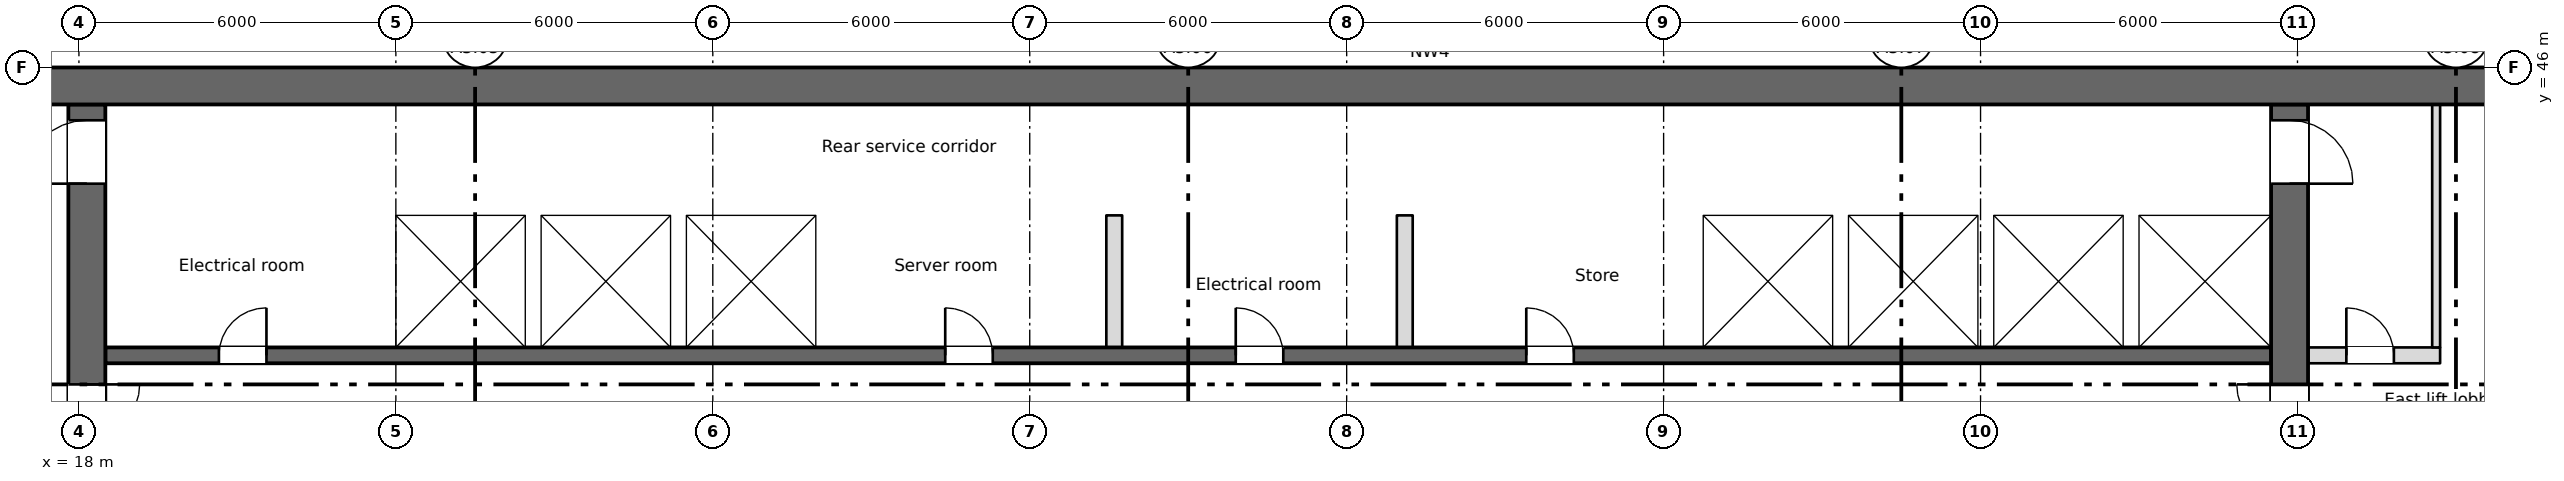
"""IFC4 building model, lengths in metres.
Left out: names, types, materials, properties, quantities, classifications, styles, units other than length and angle.
Written with IfcOpenShell. Run it as: python <this file> out.ifc"""

import sys

from ifc_helpers import new_model, si_unit, direction, frame, frame_2d, origin, place, context, subcontext, project, spatial, rectangle, extrude, element, fill, save


model = new_model("IFC4")
c1 = context("Model", 3, precision=1e-05, world=origin(), true_north=direction((0.0, 1.0)))
c2 = subcontext(c1, "Body", "Model", "MODEL_VIEW")
j1 = project(units=[si_unit("LENGTHUNIT", "METRE"), si_unit("PLANEANGLEUNIT", "RADIAN")], contexts=[c1])
p1 = place(None, origin())
s1 = spatial("IfcSite", under=j1, at=p1, CompositionType="ELEMENT")
p2 = place(p1, origin())
s2 = spatial("IfcBuilding", under=s1, at=p2, CompositionType="ELEMENT")
p3 = place(p2, frame((0.0, 0.0, 223.0)))
s3 = spatial("IfcBuildingStorey", under=s2, at=p3, CompositionType="ELEMENT", Elevation=223.0)
p4 = place(p3, frame((11.55, 45.65, 0.0), z_axis=(0.0, 0.0, 1.0), x_axis=(1.0, 0.0, 0.0)))
e1 = element("IfcWall", 1, at=p4, inside=s3, PredefinedType="SHEAR", context=c2, shape_type="SweptSolid", body=[
    extrude(rectangle(XDim=54.9, YDim=0.7, at=frame_2d((27.45, 0.0))), origin(), (0.0, 0.0, 1.0), 3.15),
])
p5 = place(p4, frame((1.2, 0.0, 0.6)))
e2 = element("IfcOpeningElement", 2, at=p5, cuts=e1, PredefinedType="OPENING", context=c2, shape_type="SweptSolid", body=[
    extrude(rectangle(XDim=0.6, YDim=2.4, at=frame_2d((0.3, 1.2))), frame((0.0, 0.36, 0.0), z_axis=(0.0, -1.0, 0.0), x_axis=(1.0, 0.0, 0.0)), (0.0, 0.0, 1.0), 0.72),
])
p6 = place(p3, frame((18.15, 28.4, 0.0), z_axis=(0.0, 0.0, 1.0), x_axis=(0.0, 1.0, 0.0)))
e3 = element("IfcWall", 3, at=p6, inside=s3, PredefinedType="SHEAR", context=c2, shape_type="SweptSolid", body=[
    extrude(rectangle(XDim=16.9, YDim=0.7, at=frame_2d((8.45, 0.0))), origin(), (0.0, 0.0, 1.0), 3.15),
])
p7 = place(p6, frame((9.6, 0.0, 0.0)))
e4 = element("IfcOpeningElement", 4, at=p7, cuts=e3, PredefinedType="OPENING", context=c2, shape_type="SweptSolid", body=[
    extrude(rectangle(XDim=2.0, YDim=2.1, at=frame_2d((1.0, 1.05))), frame((0.0, 0.36, 0.0), z_axis=(0.0, -1.0, 0.0), x_axis=(1.0, 0.0, 0.0)), (0.0, 0.0, 1.0), 0.72),
])
p8 = place(p6, frame((15.4, 0.0, 0.0)))
e5 = element("IfcOpeningElement", 5, at=p8, cuts=e3, PredefinedType="OPENING", context=c2, shape_type="SweptSolid", body=[
    extrude(rectangle(XDim=1.2, YDim=2.1, at=frame_2d((0.6, 1.05))), frame((0.0, 0.36, 0.0), z_axis=(0.0, -1.0, 0.0), x_axis=(1.0, 0.0, 0.0)), (0.0, 0.0, 1.0), 0.72),
])
p9 = place(p3, frame((59.85, 28.4, 0.0), z_axis=(0.0, 0.0, 1.0), x_axis=(0.0, 1.0, 0.0)))
e6 = element("IfcWall", 6, at=p9, inside=s3, PredefinedType="SHEAR", context=c2, shape_type="SweptSolid", body=[
    extrude(rectangle(XDim=16.9, YDim=0.7, at=frame_2d((8.45, 0.0))), origin(), (0.0, 0.0, 1.0), 3.15),
])
p10 = place(p9, frame((9.6, 0.0, 0.0)))
e7 = element("IfcOpeningElement", 7, at=p10, cuts=e6, PredefinedType="OPENING", context=c2, shape_type="SweptSolid", body=[
    extrude(rectangle(XDim=2.0, YDim=2.1, at=frame_2d((1.0, 1.05))), frame((0.0, 0.36, 0.0), z_axis=(0.0, -1.0, 0.0), x_axis=(1.0, 0.0, 0.0)), (0.0, 0.0, 1.0), 0.72),
])
p11 = place(p9, frame((15.4, 0.0, 0.0)))
e8 = element("IfcOpeningElement", 8, at=p11, cuts=e6, PredefinedType="OPENING", context=c2, shape_type="SweptSolid", body=[
    extrude(rectangle(XDim=1.2, YDim=2.1, at=frame_2d((0.6, 1.05))), frame((0.0, 0.36, 0.0), z_axis=(0.0, -1.0, 0.0), x_axis=(1.0, 0.0, 0.0)), (0.0, 0.0, 1.0), 0.72),
])
p12 = place(p3, frame((18.5, 40.55, 0.0), z_axis=(0.0, 0.0, 1.0), x_axis=(1.0, 0.0, 0.0)))
e9 = element("IfcWall", 9, at=p12, inside=s3, PredefinedType="SHEAR", context=c2, shape_type="SweptSolid", body=[
    extrude(rectangle(XDim=41.0, YDim=0.3, at=frame_2d((20.5, 0.0))), origin(), (0.0, 0.0, 1.0), 3.15),
])
p13 = place(p12, frame((2.15, 0.0, 0.0)))
e10 = element("IfcOpeningElement", 10, at=p13, cuts=e9, PredefinedType="OPENING", context=c2, shape_type="SweptSolid", body=[
    extrude(rectangle(XDim=0.9, YDim=2.1, at=frame_2d((0.45, 1.05))), frame((0.0, 0.16, 0.0), z_axis=(0.0, -1.0, 0.0), x_axis=(1.0, 0.0, 0.0)), (0.0, 0.0, 1.0), 0.32),
])
p14 = place(p12, frame((15.9, 0.0, 0.0)))
e11 = element("IfcOpeningElement", 11, at=p14, cuts=e9, PredefinedType="OPENING", context=c2, shape_type="SweptSolid", body=[
    extrude(rectangle(XDim=0.9, YDim=2.1, at=frame_2d((0.45, 1.05))), frame((0.0, 0.16, 0.0), z_axis=(0.0, -1.0, 0.0), x_axis=(1.0, 0.0, 0.0)), (0.0, 0.0, 1.0), 0.32),
])
p15 = place(p12, frame((21.4, 0.0, 0.0)))
e12 = element("IfcOpeningElement", 12, at=p15, cuts=e9, PredefinedType="OPENING", context=c2, shape_type="SweptSolid", body=[
    extrude(rectangle(XDim=0.9, YDim=2.1, at=frame_2d((0.45, 1.05))), frame((0.0, 0.16, 0.0), z_axis=(0.0, -1.0, 0.0), x_axis=(1.0, 0.0, 0.0)), (0.0, 0.0, 1.0), 0.32),
])
p16 = place(p12, frame((26.9, 0.0, 0.0)))
e13 = element("IfcOpeningElement", 13, at=p16, cuts=e9, PredefinedType="OPENING", context=c2, shape_type="SweptSolid", body=[
    extrude(rectangle(XDim=0.9, YDim=2.1, at=frame_2d((0.45, 1.05))), frame((0.0, 0.16, 0.0), z_axis=(0.0, -1.0, 0.0), x_axis=(1.0, 0.0, 0.0)), (0.0, 0.0, 1.0), 0.32),
])
p17 = place(p12, frame((6.175, 0.0, 0.0)))
e14 = element("IfcOpeningElement", 14, at=p17, cuts=e9, PredefinedType="OPENING", context=c2, shape_type="SweptSolid", body=[
    extrude(rectangle(XDim=1.1, YDim=2.1, at=frame_2d((0.55, 1.05))), frame((0.0, 0.16, 0.0), z_axis=(0.0, -1.0, 0.0), x_axis=(1.0, 0.0, 0.0)), (0.0, 0.0, 1.0), 0.32),
])
p18 = place(p12, frame((8.925, 0.0, 0.0)))
e15 = element("IfcOpeningElement", 15, at=p18, cuts=e9, PredefinedType="OPENING", context=c2, shape_type="SweptSolid", body=[
    extrude(rectangle(XDim=1.1, YDim=2.1, at=frame_2d((0.55, 1.05))), frame((0.0, 0.16, 0.0), z_axis=(0.0, -1.0, 0.0), x_axis=(1.0, 0.0, 0.0)), (0.0, 0.0, 1.0), 0.32),
])
p19 = place(p12, frame((11.675, 0.0, 0.0)))
e16 = element("IfcOpeningElement", 16, at=p19, cuts=e9, PredefinedType="OPENING", context=c2, shape_type="SweptSolid", body=[
    extrude(rectangle(XDim=1.1, YDim=2.1, at=frame_2d((0.55, 1.05))), frame((0.0, 0.16, 0.0), z_axis=(0.0, -1.0, 0.0), x_axis=(1.0, 0.0, 0.0)), (0.0, 0.0, 1.0), 0.32),
])
p20 = place(p12, frame((30.925, 0.0, 0.0)))
e17 = element("IfcOpeningElement", 17, at=p20, cuts=e9, PredefinedType="OPENING", context=c2, shape_type="SweptSolid", body=[
    extrude(rectangle(XDim=1.1, YDim=2.1, at=frame_2d((0.55, 1.05))), frame((0.0, 0.16, 0.0), z_axis=(0.0, -1.0, 0.0), x_axis=(1.0, 0.0, 0.0)), (0.0, 0.0, 1.0), 0.32),
])
p21 = place(p12, frame((33.675, 0.0, 0.0)))
e18 = element("IfcOpeningElement", 18, at=p21, cuts=e9, PredefinedType="OPENING", context=c2, shape_type="SweptSolid", body=[
    extrude(rectangle(XDim=1.1, YDim=2.1, at=frame_2d((0.55, 1.05))), frame((0.0, 0.16, 0.0), z_axis=(0.0, -1.0, 0.0), x_axis=(1.0, 0.0, 0.0)), (0.0, 0.0, 1.0), 0.32),
])
p22 = place(p12, frame((36.375, 0.0, 0.0)))
e19 = element("IfcOpeningElement", 19, at=p22, cuts=e9, PredefinedType="OPENING", context=c2, shape_type="SweptSolid", body=[
    extrude(rectangle(XDim=1.2, YDim=2.1, at=frame_2d((0.6, 1.05))), frame((0.0, 0.16, 0.0), z_axis=(0.0, -1.0, 0.0), x_axis=(1.0, 0.0, 0.0)), (0.0, 0.0, 1.0), 0.32),
])
p23 = place(p12, frame((39.15, 0.0, 0.0)))
e20 = element("IfcOpeningElement", 20, at=p23, cuts=e9, PredefinedType="OPENING", context=c2, shape_type="SweptSolid", body=[
    extrude(rectangle(XDim=1.2, YDim=2.1, at=frame_2d((0.6, 1.05))), frame((0.0, 0.16, 0.0), z_axis=(0.0, -1.0, 0.0), x_axis=(1.0, 0.0, 0.0)), (0.0, 0.0, 1.0), 0.32),
])
p24 = place(p3, frame((18.5, 43.35, 0.0), z_axis=(0.0, 0.0, 1.0), x_axis=(1.0, 0.0, 0.0)))
e21 = element("IfcWall", 21, at=p24, inside=s3, PredefinedType="SHEAR", context=c2, shape_type="SweptSolid", body=[
    extrude(rectangle(XDim=41.0, YDim=0.3, at=frame_2d((20.5, 0.0))), origin(), (0.0, 0.0, 1.0), 3.15),
])
p25 = place(p3, frame((60.2, 40.55, 0.0), z_axis=(0.0, 0.0, 1.0), x_axis=(1.0, 0.0, 0.0)))
e22 = element("IfcWall", 22, at=p25, inside=s3, PredefinedType="PARTITIONING", context=c2, shape_type="SweptSolid", body=[
    extrude(rectangle(XDim=2.5, YDim=0.3, at=frame_2d((1.25, 0.0))), origin(), (0.0, 0.0, 1.0), 3.15),
])
p26 = place(p25, frame((0.725, 0.0, 0.0)))
e23 = element("IfcOpeningElement", 23, at=p26, cuts=e22, PredefinedType="OPENING", context=c2, shape_type="SweptSolid", body=[
    extrude(rectangle(XDim=0.9, YDim=2.1, at=frame_2d((0.45, 1.05))), frame((0.0, 0.16, 0.0), z_axis=(0.0, -1.0, 0.0), x_axis=(1.0, 0.0, 0.0)), (0.0, 0.0, 1.0), 0.32),
])
for number, where, z_axis, x_axis in (
    (24, (23.85, 40.7, 0.0), (0.0, 0.0, 1.0), (0.0, 1.0, 0.0)),
    (25, (26.6, 40.7, 0.0), (0.0, 0.0, 1.0), (0.0, 1.0, 0.0)),
    (26, (29.35, 40.7, 0.0), (0.0, 0.0, 1.0), (0.0, 1.0, 0.0)),
    (27, (32.1, 40.7, 0.0), (0.0, 0.0, 1.0), (0.0, 1.0, 0.0)),
    (28, (48.6, 40.7, 0.0), (0.0, 0.0, 1.0), (0.0, 1.0, 0.0)),
    (29, (51.35, 40.7, 0.0), (0.0, 0.0, 1.0), (0.0, 1.0, 0.0)),
    (30, (54.1, 40.7, 0.0), (0.0, 0.0, 1.0), (0.0, 1.0, 0.0)),
    (31, (56.85, 40.7, 0.0), (0.0, 0.0, 1.0), (0.0, 1.0, 0.0)),
):
    element("IfcWall", number, at=place(p3, frame(where, z_axis=z_axis, x_axis=x_axis)), inside=s3, PredefinedType="SHEAR", context=c2, shape_type="SweptSolid", body=[
        extrude(rectangle(XDim=2.5, YDim=0.3, at=frame_2d((1.25, 0.0))), origin(), (0.0, 0.0, 1.0), 3.15),
    ])
p27 = place(p3, frame((62.625, 40.7, 0.0), z_axis=(0.0, 0.0, 1.0), x_axis=(0.0, 1.0, 0.0)))
e32 = element("IfcWall", 32, at=p27, inside=s3, PredefinedType="PARTITIONING", context=c2, shape_type="SweptSolid", body=[
    extrude(rectangle(XDim=4.6, YDim=0.15, at=frame_2d((2.3, 0.0))), origin(), (0.0, 0.0, 1.0), 3.15),
])
for number, where, z_axis, x_axis in (
    (33, (37.6, 40.7, 0.0), (0.0, 0.0, 1.0), (0.0, 1.0, 0.0)),
    (34, (43.1, 40.7, 0.0), (0.0, 0.0, 1.0), (0.0, 1.0, 0.0)),
):
    element("IfcWall", number, at=place(p3, frame(where, z_axis=z_axis, x_axis=x_axis)), inside=s3, PredefinedType="PARTITIONING", context=c2, shape_type="SweptSolid", body=[
        extrude(rectangle(XDim=2.5, YDim=0.3, at=frame_2d((1.25, 0.0))), origin(), (0.0, 0.0, 1.0), 3.15),
    ])
p28 = place(p26, origin())
e35 = element("IfcDoor", 35, at=p28, inside=s3, OperationType="SINGLE_SWING_LEFT", PredefinedType="DOOR", context=c2, shape_type="SweptSolid", body=[
    extrude(rectangle(XDim=0.9, YDim=2.1, at=frame_2d((0.45, 1.05))), frame((0.0, 0.025, 0.0), z_axis=(0.0, -1.0, 0.0), x_axis=(1.0, 0.0, 0.0)), (0.0, 0.0, 1.0), 0.05),
])
fill(e23, e35)
p29 = place(p13, origin())
e36 = element("IfcDoor", 36, at=p29, inside=s3, OperationType="SINGLE_SWING_RIGHT", PredefinedType="DOOR", context=c2, shape_type="SweptSolid", body=[
    extrude(rectangle(XDim=0.9, YDim=2.1, at=frame_2d((0.45, 1.05))), frame((0.0, 0.025, 0.0), z_axis=(0.0, -1.0, 0.0), x_axis=(1.0, 0.0, 0.0)), (0.0, 0.0, 1.0), 0.05),
])
fill(e10, e36)
p30 = place(p14, origin())
e37 = element("IfcDoor", 37, at=p30, inside=s3, OperationType="SINGLE_SWING_LEFT", PredefinedType="DOOR", context=c2, shape_type="SweptSolid", body=[
    extrude(rectangle(XDim=0.9, YDim=2.1, at=frame_2d((0.45, 1.05))), frame((0.0, 0.025, 0.0), z_axis=(0.0, -1.0, 0.0), x_axis=(1.0, 0.0, 0.0)), (0.0, 0.0, 1.0), 0.05),
])
fill(e11, e37)
p31 = place(p15, origin())
e38 = element("IfcDoor", 38, at=p31, inside=s3, OperationType="SINGLE_SWING_LEFT", PredefinedType="DOOR", context=c2, shape_type="SweptSolid", body=[
    extrude(rectangle(XDim=0.9, YDim=2.1, at=frame_2d((0.45, 1.05))), frame((0.0, 0.025, 0.0), z_axis=(0.0, -1.0, 0.0), x_axis=(1.0, 0.0, 0.0)), (0.0, 0.0, 1.0), 0.05),
])
fill(e12, e38)
p32 = place(p16, origin())
e39 = element("IfcDoor", 39, at=p32, inside=s3, OperationType="SINGLE_SWING_LEFT", PredefinedType="DOOR", context=c2, shape_type="SweptSolid", body=[
    extrude(rectangle(XDim=0.9, YDim=2.1, at=frame_2d((0.45, 1.05))), frame((0.0, 0.025, 0.0), z_axis=(0.0, -1.0, 0.0), x_axis=(1.0, 0.0, 0.0)), (0.0, 0.0, 1.0), 0.05),
])
fill(e13, e39)
p33 = place(p17, origin())
e40 = element("IfcDoor", 40, at=p33, inside=s3, OperationType="SLIDING_TO_LEFT", PredefinedType="DOOR", context=c2, shape_type="SweptSolid", body=[
    extrude(rectangle(XDim=1.1, YDim=2.1, at=frame_2d((0.55, 1.05))), frame((0.0, 0.025, 0.0), z_axis=(0.0, -1.0, 0.0), x_axis=(1.0, 0.0, 0.0)), (0.0, 0.0, 1.0), 0.05),
])
fill(e14, e40)
p34 = place(p18, origin())
e41 = element("IfcDoor", 41, at=p34, inside=s3, OperationType="SLIDING_TO_LEFT", PredefinedType="DOOR", context=c2, shape_type="SweptSolid", body=[
    extrude(rectangle(XDim=1.1, YDim=2.1, at=frame_2d((0.55, 1.05))), frame((0.0, 0.025, 0.0), z_axis=(0.0, -1.0, 0.0), x_axis=(1.0, 0.0, 0.0)), (0.0, 0.0, 1.0), 0.05),
])
fill(e15, e41)
p35 = place(p19, origin())
e42 = element("IfcDoor", 42, at=p35, inside=s3, OperationType="SLIDING_TO_LEFT", PredefinedType="DOOR", context=c2, shape_type="SweptSolid", body=[
    extrude(rectangle(XDim=1.1, YDim=2.1, at=frame_2d((0.55, 1.05))), frame((0.0, 0.025, 0.0), z_axis=(0.0, -1.0, 0.0), x_axis=(1.0, 0.0, 0.0)), (0.0, 0.0, 1.0), 0.05),
])
fill(e16, e42)
p36 = place(p20, origin())
e43 = element("IfcDoor", 43, at=p36, inside=s3, OperationType="SLIDING_TO_LEFT", PredefinedType="DOOR", context=c2, shape_type="SweptSolid", body=[
    extrude(rectangle(XDim=1.1, YDim=2.1, at=frame_2d((0.55, 1.05))), frame((0.0, 0.025, 0.0), z_axis=(0.0, -1.0, 0.0), x_axis=(1.0, 0.0, 0.0)), (0.0, 0.0, 1.0), 0.05),
])
fill(e17, e43)
p37 = place(p21, origin())
e44 = element("IfcDoor", 44, at=p37, inside=s3, OperationType="SLIDING_TO_LEFT", PredefinedType="DOOR", context=c2, shape_type="SweptSolid", body=[
    extrude(rectangle(XDim=1.1, YDim=2.1, at=frame_2d((0.55, 1.05))), frame((0.0, 0.025, 0.0), z_axis=(0.0, -1.0, 0.0), x_axis=(1.0, 0.0, 0.0)), (0.0, 0.0, 1.0), 0.05),
])
fill(e18, e44)
p38 = place(p22, origin())
e45 = element("IfcDoor", 45, at=p38, inside=s3, OperationType="SLIDING_TO_LEFT", PredefinedType="DOOR", context=c2, shape_type="SweptSolid", body=[
    extrude(rectangle(XDim=1.2, YDim=2.1, at=frame_2d((0.6, 1.05))), frame((0.0, 0.025, 0.0), z_axis=(0.0, -1.0, 0.0), x_axis=(1.0, 0.0, 0.0)), (0.0, 0.0, 1.0), 0.05),
])
fill(e19, e45)
p39 = place(p23, origin())
e46 = element("IfcDoor", 46, at=p39, inside=s3, OperationType="SLIDING_TO_LEFT", PredefinedType="DOOR", context=c2, shape_type="SweptSolid", body=[
    extrude(rectangle(XDim=1.2, YDim=2.1, at=frame_2d((0.6, 1.05))), frame((0.0, 0.025, 0.0), z_axis=(0.0, -1.0, 0.0), x_axis=(1.0, 0.0, 0.0)), (0.0, 0.0, 1.0), 0.05),
])
fill(e20, e46)
p40 = place(p7, origin())
e47 = element("IfcDoor", 47, at=p40, inside=s3, OperationType="DOUBLE_DOOR_SINGLE_SWING", PredefinedType="DOOR", context=c2, shape_type="SweptSolid", body=[
    extrude(rectangle(XDim=2.0, YDim=2.1, at=frame_2d((1.0, 1.05))), frame((0.0, 0.025, 0.0), z_axis=(0.0, -1.0, 0.0), x_axis=(1.0, 0.0, 0.0)), (0.0, 0.0, 1.0), 0.05),
])
fill(e4, e47)
p41 = place(p10, origin())
e48 = element("IfcDoor", 48, at=p41, inside=s3, OperationType="DOUBLE_DOOR_SINGLE_SWING", PredefinedType="DOOR", context=c2, shape_type="SweptSolid", body=[
    extrude(rectangle(XDim=2.0, YDim=2.1, at=frame_2d((1.0, 1.05))), frame((0.0, 0.025, 0.0), z_axis=(0.0, -1.0, 0.0), x_axis=(1.0, 0.0, 0.0)), (0.0, 0.0, 1.0), 0.05),
])
fill(e7, e48)
p42 = place(p8, origin())
e49 = element("IfcDoor", 49, at=p42, inside=s3, OperationType="SINGLE_SWING_LEFT", PredefinedType="DOOR", context=c2, shape_type="SweptSolid", body=[
    extrude(rectangle(XDim=1.2, YDim=2.1, at=frame_2d((0.6, 1.05))), frame((0.0, 0.025, 0.0), z_axis=(0.0, -1.0, 0.0), x_axis=(1.0, 0.0, 0.0)), (0.0, 0.0, 1.0), 0.05),
])
fill(e5, e49)
p43 = place(p11, origin())
e50 = element("IfcDoor", 50, at=p43, inside=s3, OperationType="SINGLE_SWING_LEFT", PredefinedType="DOOR", context=c2, shape_type="SweptSolid", body=[
    extrude(rectangle(XDim=1.2, YDim=2.1, at=frame_2d((0.6, 1.05))), frame((0.0, 0.025, 0.0), z_axis=(0.0, -1.0, 0.0), x_axis=(1.0, 0.0, 0.0)), (0.0, 0.0, 1.0), 0.05),
])
fill(e8, e50)
save(model, sys.argv[1])
